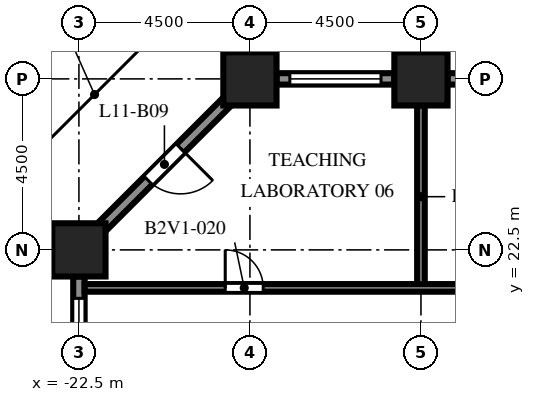
"""IFC4 building model, lengths in metres.
Left out: names, types, materials, properties, quantities, classifications, styles, units other than length and angle.
Written with IfcOpenShell. Run it as: python <this file> out.ifc"""

import sys

from ifc_helpers import new_model, si_unit, direction, frame, frame_2d, origin, origin_2d, place, context, subcontext, project, spatial, rectangle, extrude, element, fill, save


model = new_model("IFC4")
c1 = context("Model", 3, precision=1e-05, world=origin(), true_north=direction((0.0, 1.0)))
c2 = subcontext(c1, "Body", "Model", "MODEL_VIEW")
j1 = project(units=[si_unit("LENGTHUNIT", "METRE"), si_unit("PLANEANGLEUNIT", "RADIAN")], contexts=[c1])
p1 = place(None, origin())
s1 = spatial("IfcSite", under=j1, at=p1, CompositionType="ELEMENT")
p2 = place(p1, origin())
s2 = spatial("IfcBuilding", under=s1, at=p2, CompositionType="ELEMENT")
p3 = place(p2, frame((0.0, 0.0, 50.1)))
s3 = spatial("IfcBuildingStorey", under=s2, at=p3, CompositionType="ELEMENT", Elevation=50.1)
for number, where, z_axis, x_axis in (
    (1, (-22.5, 22.5, 0.0), (0.0, 0.0, 1.0), (1.0, 0.0, 0.0)),
    (2, (-18.0, 27.0, 0.0), (0.0, 0.0, 1.0), (1.0, 0.0, 0.0)),
    (3, (-13.5, 27.0, 0.0), (0.0, 0.0, 1.0), (1.0, 0.0, 0.0)),
):
    element("IfcColumn", number, at=place(p3, frame(where, z_axis=z_axis, x_axis=x_axis)), inside=s3, PredefinedType="COLUMN", context=c2, shape_type="SweptSolid", body=[
        extrude(rectangle(XDim=1.4, YDim=1.4, at=origin_2d()), origin(), (0.0, 0.0, 1.0), 4.1),
    ])
p4 = place(p3, frame((-12.8, 27.0, 0.0), z_axis=(0.0, 0.0, 1.0), x_axis=(1.0, 0.0, 0.0)))
e4 = element("IfcWall", 4, at=p4, inside=s3, PredefinedType="SOLIDWALL", context=c2, shape_type="SweptSolid", body=[
    extrude(rectangle(XDim=3.1, YDim=0.3, at=frame_2d((1.55, 0.0))), origin(), (0.0, 0.0, 1.0), 2.75),
])
p5 = place(p4, frame((1.05, 0.0, 0.0)))
e5 = element("IfcOpeningElement", 5, at=p5, cuts=e4, PredefinedType="OPENING", context=c2, shape_type="SweptSolid", body=[
    extrude(rectangle(XDim=1.0, YDim=2.2, at=frame_2d((0.5, 1.1))), frame((0.0, 0.16, 0.0), z_axis=(0.0, -1.0, 0.0), x_axis=(1.0, 0.0, 0.0)), (0.0, 0.0, 1.0), 0.32),
])
p6 = place(p3, frame((-17.3, 27.0, 0.0), z_axis=(0.0, 0.0, 1.0), x_axis=(1.0, 0.0, 0.0)))
e6 = element("IfcWall", 6, at=p6, inside=s3, PredefinedType="SOLIDWALL", context=c2, shape_type="SweptSolid", body=[
    extrude(rectangle(XDim=3.1, YDim=0.3, at=frame_2d((1.55, 0.0))), origin(), (0.0, 0.0, 1.0), 2.75),
])
p7 = place(p6, frame((0.35, 0.0, 0.8)))
e7 = element("IfcOpeningElement", 7, at=p7, cuts=e6, PredefinedType="OPENING", context=c2, shape_type="SweptSolid", body=[
    extrude(rectangle(XDim=2.4, YDim=1.7, at=frame_2d((1.2, 0.85))), frame((0.0, 0.16, 0.0), z_axis=(0.0, -1.0, 0.0), x_axis=(1.0, 0.0, 0.0)), (0.0, 0.0, 1.0), 0.32),
])
p8 = place(p3, frame((-21.906, 23.094, 0.0), z_axis=(0.0, 0.0, 1.0), x_axis=(0.707106781187, 0.707106781187, 0.0)))
e8 = element("IfcWall", 8, at=p8, inside=s3, PredefinedType="SOLIDWALL", context=c2, shape_type="SweptSolid", body=[
    extrude(rectangle(XDim=4.684, YDim=0.3, at=frame_2d((2.342, 0.0))), origin(), (0.0, 0.0, 1.0), 2.75),
])
p9 = place(p8, frame((1.742, 0.0, 0.0)))
e9 = element("IfcOpeningElement", 9, at=p9, cuts=e8, PredefinedType="OPENING", context=c2, shape_type="SweptSolid", body=[
    extrude(rectangle(XDim=1.2, YDim=2.2, at=frame_2d((0.6, 1.1))), frame((0.0, 0.16, 0.0), z_axis=(0.0, -1.0, 0.0), x_axis=(1.0, 0.0, 0.0)), (0.0, 0.0, 1.0), 0.32),
])
p10 = place(p3, frame((-22.5, 18.7, 0.0), z_axis=(0.0, 0.0, 1.0), x_axis=(0.0, 1.0, 0.0)))
e10 = element("IfcWall", 10, at=p10, inside=s3, PredefinedType="SOLIDWALL", context=c2, shape_type="SweptSolid", body=[
    extrude(rectangle(XDim=3.1, YDim=0.3, at=frame_2d((1.55, 0.0))), origin(), (0.0, 0.0, 1.0), 2.75),
])
p11 = place(p10, frame((0.125, 0.0, 0.8)))
e11 = element("IfcOpeningElement", 11, at=p11, cuts=e10, PredefinedType="OPENING", context=c2, shape_type="SweptSolid", body=[
    extrude(rectangle(XDim=2.4, YDim=1.7, at=frame_2d((1.2, 0.85))), frame((0.0, 0.16, 0.0), z_axis=(0.0, -1.0, 0.0), x_axis=(1.0, 0.0, 0.0)), (0.0, 0.0, 1.0), 0.32),
])
p12 = place(p3, frame((-13.5, 21.5, 0.0), z_axis=(0.0, 0.0, 1.0), x_axis=(0.0, 1.0, 0.0)))
e12 = element("IfcWall", 12, at=p12, inside=s3, PredefinedType="PARTITIONING", context=c2, shape_type="SweptSolid", body=[
    extrude(rectangle(XDim=4.8, YDim=0.2, at=frame_2d((2.4, 0.0))), origin(), (0.0, 0.0, 1.0), 3.65),
])
p13 = place(p3, frame((-22.35, 21.5, 0.0), z_axis=(0.0, 0.0, 1.0), x_axis=(1.0, 0.0, 0.0)))
e13 = element("IfcWall", 13, at=p13, inside=s3, PredefinedType="PARTITIONING", context=c2, shape_type="SweptSolid", body=[
    extrude(rectangle(XDim=53.7, YDim=0.2, at=frame_2d((26.85, 0.0))), origin(), (0.0, 0.0, 1.0), 3.65),
])
p14 = place(p13, frame((3.7, 0.0, 0.0)))
e14 = element("IfcOpeningElement", 14, at=p14, cuts=e13, PredefinedType="OPENING", context=c2, shape_type="SweptSolid", body=[
    extrude(rectangle(XDim=1.0, YDim=2.1, at=frame_2d((0.5, 1.05))), frame((0.0, 0.11, 0.0), z_axis=(0.0, -1.0, 0.0), x_axis=(1.0, 0.0, 0.0)), (0.0, 0.0, 1.0), 0.22),
])
p15 = place(p13, frame((14.2, 0.0, 0.0)))
e15 = element("IfcOpeningElement", 15, at=p15, cuts=e13, PredefinedType="OPENING", context=c2, shape_type="SweptSolid", body=[
    extrude(rectangle(XDim=1.0, YDim=2.1, at=frame_2d((0.5, 1.05))), frame((0.0, 0.11, 0.0), z_axis=(0.0, -1.0, 0.0), x_axis=(1.0, 0.0, 0.0)), (0.0, 0.0, 1.0), 0.22),
])
p16 = place(p13, frame((29.45, 0.0, 0.0)))
e16 = element("IfcOpeningElement", 16, at=p16, cuts=e13, PredefinedType="OPENING", context=c2, shape_type="SweptSolid", body=[
    extrude(rectangle(XDim=1.0, YDim=2.1, at=frame_2d((0.5, 1.05))), frame((0.0, 0.11, 0.0), z_axis=(0.0, -1.0, 0.0), x_axis=(1.0, 0.0, 0.0)), (0.0, 0.0, 1.0), 0.22),
])
p17 = place(p13, frame((41.2, 0.0, 0.0)))
e17 = element("IfcOpeningElement", 17, at=p17, cuts=e13, PredefinedType="OPENING", context=c2, shape_type="SweptSolid", body=[
    extrude(rectangle(XDim=1.0, YDim=2.1, at=frame_2d((0.5, 1.05))), frame((0.0, 0.11, 0.0), z_axis=(0.0, -1.0, 0.0), x_axis=(1.0, 0.0, 0.0)), (0.0, 0.0, 1.0), 0.22),
])
p18 = place(p13, frame((48.95, 0.0, 0.0)))
e18 = element("IfcOpeningElement", 18, at=p18, cuts=e13, PredefinedType="OPENING", context=c2, shape_type="SweptSolid", body=[
    extrude(rectangle(XDim=1.0, YDim=2.1, at=frame_2d((0.5, 1.05))), frame((0.0, 0.11, 0.0), z_axis=(0.0, -1.0, 0.0), x_axis=(1.0, 0.0, 0.0)), (0.0, 0.0, 1.0), 0.22),
])
p19 = place(p7, origin())
e19 = element("IfcWindow", 19, at=p19, inside=s3, PartitioningType="SINGLE_PANEL", PredefinedType="WINDOW", context=c2, shape_type="SweptSolid", body=[
    extrude(rectangle(XDim=2.4, YDim=1.7, at=frame_2d((1.2, 0.85))), frame((0.0, 0.03, 0.0), z_axis=(0.0, -1.0, 0.0), x_axis=(1.0, 0.0, 0.0)), (0.0, 0.0, 1.0), 0.06),
])
fill(e7, e19)
p20 = place(p9, origin())
e20 = element("IfcDoor", 20, at=p20, inside=s3, OperationType="SINGLE_SWING_RIGHT", PredefinedType="DOOR", context=c2, shape_type="SweptSolid", body=[
    extrude(rectangle(XDim=1.2, YDim=2.2, at=frame_2d((0.6, 1.1))), frame((0.0, 0.025, 0.0), z_axis=(0.0, -1.0, 0.0), x_axis=(1.0, 0.0, 0.0)), (0.0, 0.0, 1.0), 0.05),
])
fill(e9, e20)
p21 = place(p11, origin())
e21 = element("IfcWindow", 21, at=p21, inside=s3, PartitioningType="SINGLE_PANEL", PredefinedType="WINDOW", context=c2, shape_type="SweptSolid", body=[
    extrude(rectangle(XDim=2.4, YDim=1.7, at=frame_2d((1.2, 0.85))), frame((0.0, 0.03, 0.0), z_axis=(0.0, -1.0, 0.0), x_axis=(1.0, 0.0, 0.0)), (0.0, 0.0, 1.0), 0.06),
])
fill(e11, e21)
p22 = place(p14, origin())
e22 = element("IfcDoor", 22, at=p22, inside=s3, OperationType="SINGLE_SWING_LEFT", PredefinedType="DOOR", context=c2, shape_type="SweptSolid", body=[
    extrude(rectangle(XDim=1.0, YDim=2.1, at=frame_2d((0.5, 1.05))), frame((0.0, 0.025, 0.0), z_axis=(0.0, -1.0, 0.0), x_axis=(1.0, 0.0, 0.0)), (0.0, 0.0, 1.0), 0.05),
])
fill(e14, e22)
save(model, sys.argv[1])
